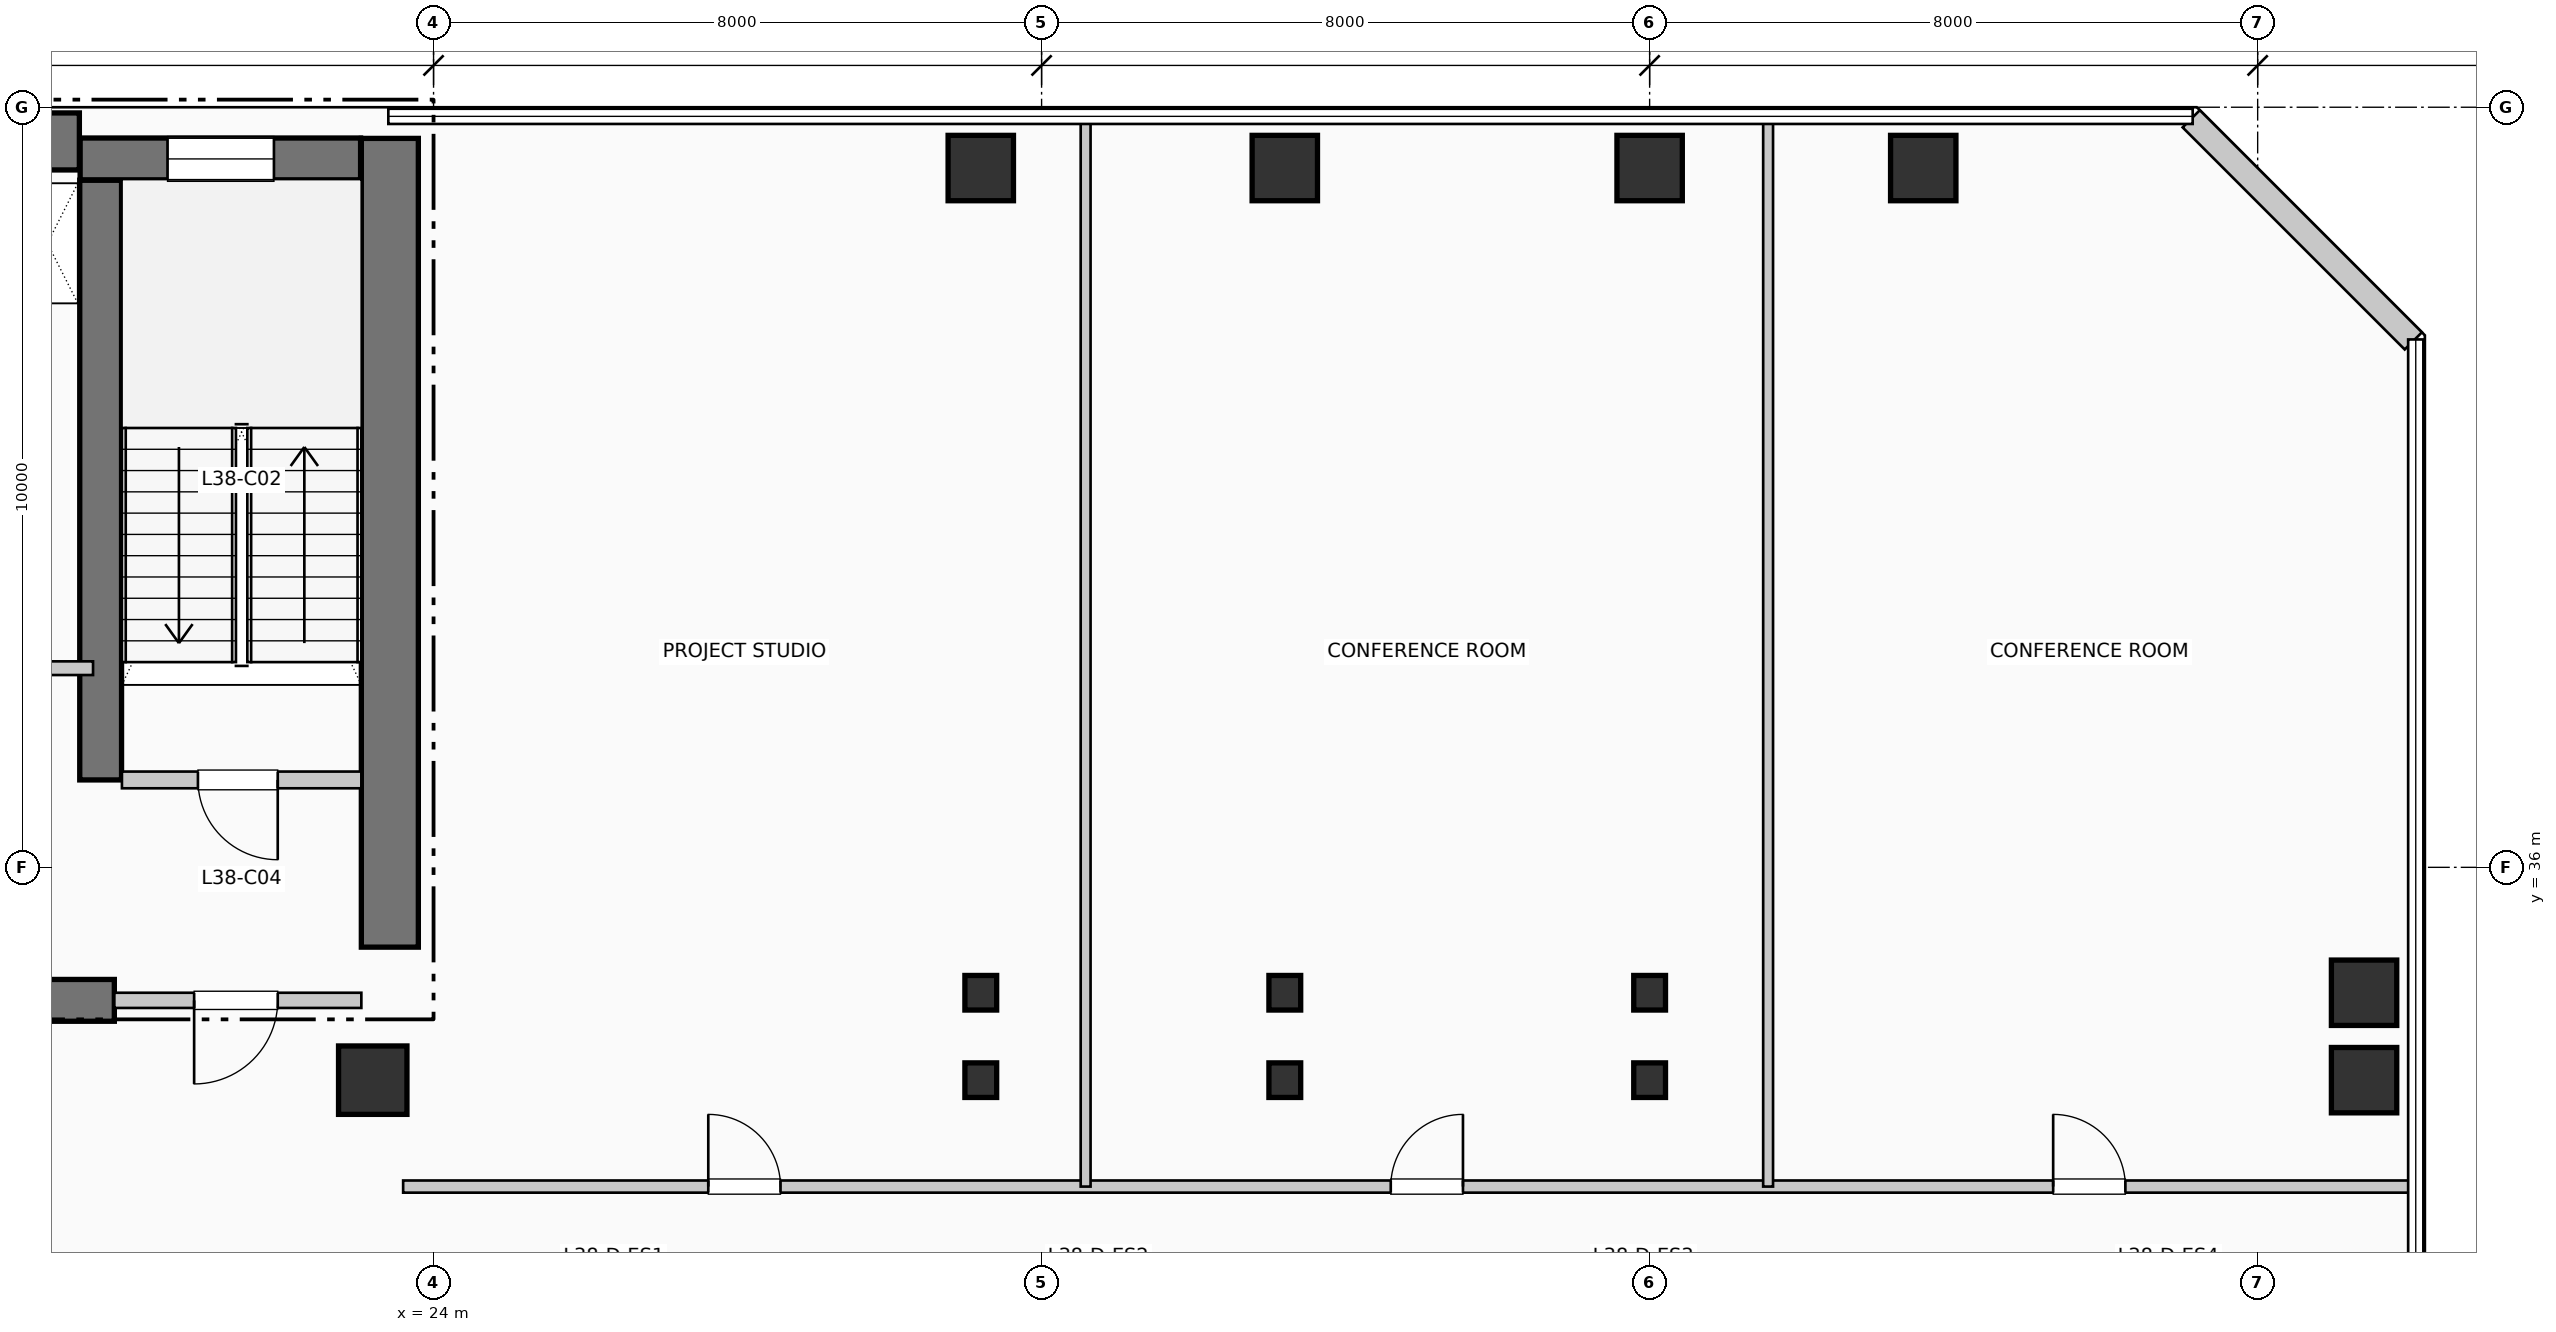
"""IFC4 building model, lengths in metres.
Left out: names, types, materials, properties, quantities, classifications, styles, units other than length and angle.
Written with IfcOpenShell. Run it as: python <this file> out.ifc"""

import sys

from ifc_helpers import new_model, si_unit, direction, frame, frame_2d, origin, origin_2d, place, context, subcontext, project, spatial, rectangle, i_section, extrude, element, fill, save


model = new_model("IFC4")
c1 = context("Model", 3, precision=1e-05, world=origin(), true_north=direction((0.0, 1.0)))
c2 = subcontext(c1, "Body", "Model", "MODEL_VIEW")
j1 = project(units=[si_unit("LENGTHUNIT", "METRE"), si_unit("PLANEANGLEUNIT", "RADIAN")], contexts=[c1])
p1 = place(None, origin())
s1 = spatial("IfcSite", under=j1, at=p1, CompositionType="ELEMENT")
p2 = place(p1, origin())
s2 = spatial("IfcBuilding", under=s1, at=p2, CompositionType="ELEMENT")
p3 = place(p2, frame((0.0, 0.0, 158.73)))
s3 = spatial("IfcBuildingStorey", under=s2, at=p3, CompositionType="ELEMENT", Elevation=158.73)
p4 = place(p3, frame((5.36, 45.55, 0.0), z_axis=(0.0, 0.0, 1.0), x_axis=(1.0, 0.0, 0.0)))
e1 = element("IfcWall", 1, at=p4, inside=s3, PredefinedType="SHEAR", context=c2, shape_type="SweptSolid", body=[
    extrude(rectangle(XDim=13.98, YDim=0.75, at=frame_2d((6.99, 0.0))), origin(), (0.0, 0.0, 1.0), 3.96),
])
p5 = place(p3, frame((23.425, 34.95, 0.0), z_axis=(0.0, 0.0, 1.0), x_axis=(0.0, 1.0, 0.0)))
e2 = element("IfcWall", 2, at=p5, inside=s3, PredefinedType="SHEAR", context=c2, shape_type="SweptSolid", body=[
    extrude(rectangle(XDim=10.64, YDim=0.75, at=frame_2d((5.32, 0.0))), origin(), (0.0, 0.0, 1.0), 3.96),
])
p6 = place(p3, frame((13.68, 34.25, 0.0), z_axis=(0.0, 0.0, 1.0), x_axis=(1.0, 0.0, 0.0)))
e3 = element("IfcWall", 3, at=p6, inside=s3, PredefinedType="SHEAR", context=c2, shape_type="SweptSolid", body=[
    extrude(rectangle(XDim=6.12, YDim=0.55, at=frame_2d((3.06, 0.0))), origin(), (0.0, 0.0, 1.0), 3.96),
])
p7 = place(p3, frame((19.62, 37.15, 0.0), z_axis=(0.0, 0.0, 1.0), x_axis=(0.0, 1.0, 0.0)))
e4 = element("IfcWall", 4, at=p7, inside=s3, PredefinedType="SHEAR", context=c2, shape_type="SweptSolid", body=[
    extrude(rectangle(XDim=7.89, YDim=0.55, at=frame_2d((3.945, 0.0))), origin(), (0.0, 0.0, 1.0), 3.96),
])
p8 = place(p3, frame((19.35, 45.32, 0.0), z_axis=(0.0, 0.0, 1.0), x_axis=(1.0, 0.0, 0.0)))
e5 = element("IfcWall", 5, at=p8, inside=s3, PredefinedType="SHEAR", context=c2, shape_type="SweptSolid", body=[
    extrude(rectangle(XDim=3.69, YDim=0.55, at=frame_2d((1.845, 0.0))), origin(), (0.0, 0.0, 1.0), 3.96),
])
p9 = place(p8, frame((1.15, 0.0, 1.05)))
e6 = element("IfcOpeningElement", 6, at=p9, cuts=e5, PredefinedType="OPENING", context=c2, shape_type="SweptSolid", body=[
    extrude(rectangle(XDim=1.4, YDim=1.8, at=frame_2d((0.7, 0.9))), frame((0.0, 0.285, 0.0), z_axis=(0.0, -1.0, 0.0), x_axis=(1.0, 0.0, 0.0)), (0.0, 0.0, 1.0), 0.57),
])
p10 = place(p3, frame((23.2, 33.2, 0.0), z_axis=(0.0, 0.0, 1.0), x_axis=(1.0, 0.0, 0.0)))
e7 = element("IfcColumn", 7, at=p10, inside=s3, PredefinedType="COLUMN", context=c2, shape_type="SweptSolid", body=[
    extrude(rectangle(XDim=0.9, YDim=0.9, at=origin_2d()), origin(), (0.0, 0.0, 1.0), 3.96),
])
for number, where, z_axis, x_axis in (
    (8, (31.2, 33.2, 0.0), (0.0, 0.0, 1.0), (1.0, 0.0, 0.0)),
    (9, (31.2, 34.35, 0.0), (0.0, 0.0, 1.0), (1.0, 0.0, 0.0)),
):
    element("IfcColumn", number, at=place(p3, frame(where, z_axis=z_axis, x_axis=x_axis)), inside=s3, PredefinedType="COLUMN", context=c2, shape_type="SweptSolid", body=[
        extrude(i_section(OverallWidth=0.418, OverallDepth=0.455, WebThickness=0.032, FlangeThickness=0.051, at=origin_2d()), origin(), (0.0, 0.0, 1.0), 3.96),
    ])
p11 = place(p3, frame((31.2, 45.2, 0.0), z_axis=(0.0, 0.0, 1.0), x_axis=(1.0, 0.0, 0.0)))
e10 = element("IfcColumn", 10, at=p11, inside=s3, PredefinedType="COLUMN", context=c2, shape_type="SweptSolid", body=[
    extrude(rectangle(XDim=0.86, YDim=0.86, at=origin_2d()), origin(), (0.0, 0.0, 1.0), 3.96),
])
for number, where, z_axis, x_axis in (
    (11, (35.2, 33.2, 0.0), (0.0, 0.0, 1.0), (1.0, 0.0, 0.0)),
    (12, (35.2, 34.35, 0.0), (0.0, 0.0, 1.0), (1.0, 0.0, 0.0)),
):
    element("IfcColumn", number, at=place(p3, frame(where, z_axis=z_axis, x_axis=x_axis)), inside=s3, PredefinedType="COLUMN", context=c2, shape_type="SweptSolid", body=[
        extrude(i_section(OverallWidth=0.418, OverallDepth=0.455, WebThickness=0.032, FlangeThickness=0.051, at=origin_2d()), origin(), (0.0, 0.0, 1.0), 3.96),
    ])
p12 = place(p3, frame((35.2, 45.2, 0.0), z_axis=(0.0, 0.0, 1.0), x_axis=(1.0, 0.0, 0.0)))
e13 = element("IfcColumn", 13, at=p12, inside=s3, PredefinedType="COLUMN", context=c2, shape_type="SweptSolid", body=[
    extrude(rectangle(XDim=0.86, YDim=0.86, at=origin_2d()), origin(), (0.0, 0.0, 1.0), 3.96),
])
for number, where, z_axis, x_axis in (
    (14, (40.0, 33.2, 0.0), (0.0, 0.0, 1.0), (1.0, 0.0, 0.0)),
    (15, (40.0, 34.35, 0.0), (0.0, 0.0, 1.0), (1.0, 0.0, 0.0)),
):
    element("IfcColumn", number, at=place(p3, frame(where, z_axis=z_axis, x_axis=x_axis)), inside=s3, PredefinedType="COLUMN", context=c2, shape_type="SweptSolid", body=[
        extrude(i_section(OverallWidth=0.418, OverallDepth=0.455, WebThickness=0.032, FlangeThickness=0.051, at=origin_2d()), origin(), (0.0, 0.0, 1.0), 3.96),
    ])
for number, where, z_axis, x_axis in (
    (16, (40.0, 45.2, 0.0), (0.0, 0.0, 1.0), (1.0, 0.0, 0.0)),
    (17, (43.6, 45.2, 0.0), (0.0, 0.0, 1.0), (1.0, 0.0, 0.0)),
    (18, (49.4, 33.2, 0.0), (0.0, 0.0, 1.0), (1.0, 0.0, 0.0)),
    (19, (49.4, 34.35, 0.0), (0.0, 0.0, 1.0), (1.0, 0.0, 0.0)),
):
    element("IfcColumn", number, at=place(p3, frame(where, z_axis=z_axis, x_axis=x_axis)), inside=s3, PredefinedType="COLUMN", context=c2, shape_type="SweptSolid", body=[
        extrude(rectangle(XDim=0.86, YDim=0.86, at=origin_2d()), origin(), (0.0, 0.0, 1.0), 3.96),
    ])
p13 = place(p3, frame((50.048, 42.926, 0.0), z_axis=(0.0, 0.0, 1.0), x_axis=(-0.707136318428, 0.707077242712, 0.0)))
e20 = element("IfcWall", 20, at=p13, inside=s3, PredefinedType="SOLIDWALL", context=c2, shape_type="SweptSolid", body=[
    extrude(rectangle(XDim=4.133, YDim=0.32, at=frame_2d((2.066, 0.0))), origin(), (0.0, 0.0, 1.0), 3.71),
])
p14 = place(p3, frame((19.9, 37.15, 0.0), z_axis=(0.0, 0.0, 1.0), x_axis=(1.0, 0.0, 0.0)))
e21 = element("IfcWall", 21, at=p14, inside=s3, PredefinedType="PARTITIONING", context=c2, shape_type="SweptSolid", body=[
    extrude(rectangle(XDim=3.15, YDim=0.22, at=frame_2d((1.575, 0.0))), origin(), (0.0, 0.0, 1.0), 3.71),
])
p15 = place(p14, frame((2.05, 0.0, 0.0), z_axis=(0.0, 0.0, 1.0), x_axis=(-1.0, 0.0, 0.0)))
e22 = element("IfcOpeningElement", 22, at=p15, cuts=e21, PredefinedType="OPENING", context=c2, shape_type="SweptSolid", body=[
    extrude(rectangle(XDim=1.05, YDim=2.15, at=frame_2d((0.525, 1.075))), frame((0.0, 0.12, 0.0), z_axis=(0.0, -1.0, 0.0), x_axis=(1.0, 0.0, 0.0)), (0.0, 0.0, 1.0), 0.24),
])
p16 = place(p3, frame((19.8, 34.25, 0.0), z_axis=(0.0, 0.0, 1.0), x_axis=(1.0, 0.0, 0.0)))
e23 = element("IfcWall", 23, at=p16, inside=s3, PredefinedType="PARTITIONING", context=c2, shape_type="SweptSolid", body=[
    extrude(rectangle(XDim=3.25, YDim=0.2, at=frame_2d((1.625, 0.0))), origin(), (0.0, 0.0, 1.0), 3.71),
])
p17 = place(p16, frame((2.15, 0.0, 0.0), z_axis=(0.0, 0.0, 1.0), x_axis=(-1.0, 0.0, 0.0)))
e24 = element("IfcOpeningElement", 24, at=p17, cuts=e23, PredefinedType="OPENING", context=c2, shape_type="SweptSolid", body=[
    extrude(rectangle(XDim=1.1, YDim=2.15, at=frame_2d((0.55, 1.075))), frame((0.0, 0.11, 0.0), z_axis=(0.0, -1.0, 0.0), x_axis=(1.0, 0.0, 0.0)), (0.0, 0.0, 1.0), 0.22),
])
p18 = place(p3, frame((17.68, 38.62, 0.0), z_axis=(0.0, 0.0, 1.0), x_axis=(1.0, 0.0, 0.0)))
e25 = element("IfcWall", 25, at=p18, inside=s3, PredefinedType="PARTITIONING", context=c2, shape_type="SweptSolid", body=[
    extrude(rectangle(XDim=1.84, YDim=0.18, at=frame_2d((0.92, 0.0))), origin(), (0.0, 0.0, 1.0), 3.71),
])
p19 = place(p18, frame((0.24, 0.0, 0.0)))
e26 = element("IfcOpeningElement", 26, at=p19, cuts=e25, PredefinedType="OPENING", context=c2, shape_type="SweptSolid", body=[
    extrude(rectangle(XDim=0.92, YDim=2.1, at=frame_2d((0.46, 1.05))), frame((0.0, 0.1, 0.0), z_axis=(0.0, -1.0, 0.0), x_axis=(1.0, 0.0, 0.0)), (0.0, 0.0, 1.0), 0.2),
])
p20 = place(p3, frame((23.6, 31.8, 0.0), z_axis=(0.0, 0.0, 1.0), x_axis=(1.0, 0.0, 0.0)))
e27 = element("IfcWall", 27, at=p20, inside=s3, PredefinedType="PARTITIONING", context=c2, shape_type="SweptSolid", body=[
    extrude(rectangle(XDim=26.41, YDim=0.16, at=frame_2d((13.205, 0.0))), origin(), (0.0, 0.0, 1.0), 3.71),
])
p21 = place(p20, frame((4.015, 0.0, 0.0)))
e28 = element("IfcOpeningElement", 28, at=p21, cuts=e27, PredefinedType="OPENING", context=c2, shape_type="SweptSolid", body=[
    extrude(rectangle(XDim=0.95, YDim=2.15, at=frame_2d((0.475, 1.075))), frame((0.0, 0.09, 0.0), z_axis=(0.0, -1.0, 0.0), x_axis=(1.0, 0.0, 0.0)), (0.0, 0.0, 1.0), 0.18),
])
p22 = place(p20, frame((12.994, 0.0, 0.0)))
e29 = element("IfcOpeningElement", 29, at=p22, cuts=e27, PredefinedType="OPENING", context=c2, shape_type="SweptSolid", body=[
    extrude(rectangle(XDim=0.95, YDim=2.15, at=frame_2d((0.475, 1.075))), frame((0.0, 0.09, 0.0), z_axis=(0.0, -1.0, 0.0), x_axis=(1.0, 0.0, 0.0)), (0.0, 0.0, 1.0), 0.18),
])
p23 = place(p20, frame((21.709, 0.0, 0.0)))
e30 = element("IfcOpeningElement", 30, at=p23, cuts=e27, PredefinedType="OPENING", context=c2, shape_type="SweptSolid", body=[
    extrude(rectangle(XDim=0.95, YDim=2.15, at=frame_2d((0.475, 1.075))), frame((0.0, 0.09, 0.0), z_axis=(0.0, -1.0, 0.0), x_axis=(1.0, 0.0, 0.0)), (0.0, 0.0, 1.0), 0.18),
])
for number, where, z_axis, x_axis in (
    (31, (32.579, 31.8, 0.0), (0.0, 0.0, 1.0), (0.0, 1.0, 0.0)),
    (32, (41.559, 31.8, 0.0), (0.0, 0.0, 1.0), (0.0, 1.0, 0.0)),
):
    element("IfcWall", number, at=place(p3, frame(where, z_axis=z_axis, x_axis=x_axis)), inside=s3, PredefinedType="PARTITIONING", context=c2, shape_type="SweptSolid", body=[
        extrude(rectangle(XDim=14.01, YDim=0.13, at=frame_2d((7.005, 0.0))), origin(), (0.0, 0.0, 1.0), 3.71),
    ])
p24 = place(p9, origin())
e33 = element("IfcWindow", 33, at=p24, inside=s3, PartitioningType="SINGLE_PANEL", PredefinedType="WINDOW", context=c2, shape_type="SweptSolid", body=[
    extrude(rectangle(XDim=1.4, YDim=1.8, at=frame_2d((0.7, 0.9))), frame((0.0, 0.03, 0.0), z_axis=(0.0, -1.0, 0.0), x_axis=(1.0, 0.0, 0.0)), (0.0, 0.0, 1.0), 0.06),
])
fill(e6, e33)
p25 = place(p15, origin())
e34 = element("IfcDoor", 34, at=p25, inside=s3, OperationType="SINGLE_SWING_RIGHT", PredefinedType="DOOR", context=c2, shape_type="SweptSolid", body=[
    extrude(rectangle(XDim=1.05, YDim=2.15, at=frame_2d((0.525, 1.075))), frame((0.0, 0.025, 0.0), z_axis=(0.0, -1.0, 0.0), x_axis=(1.0, 0.0, 0.0)), (0.0, 0.0, 1.0), 0.05),
])
fill(e22, e34)
p26 = place(p17, origin())
e35 = element("IfcDoor", 35, at=p26, inside=s3, OperationType="SINGLE_SWING_LEFT", PredefinedType="DOOR", context=c2, shape_type="SweptSolid", body=[
    extrude(rectangle(XDim=1.1, YDim=2.15, at=frame_2d((0.55, 1.075))), frame((0.0, 0.025, 0.0), z_axis=(0.0, -1.0, 0.0), x_axis=(1.0, 0.0, 0.0)), (0.0, 0.0, 1.0), 0.05),
])
fill(e24, e35)
p27 = place(p21, origin())
e36 = element("IfcDoor", 36, at=p27, inside=s3, OperationType="SINGLE_SWING_LEFT", PredefinedType="DOOR", context=c2, shape_type="SweptSolid", body=[
    extrude(rectangle(XDim=0.95, YDim=2.15, at=frame_2d((0.475, 1.075))), frame((0.0, 0.025, 0.0), z_axis=(0.0, -1.0, 0.0), x_axis=(1.0, 0.0, 0.0)), (0.0, 0.0, 1.0), 0.05),
])
fill(e28, e36)
p28 = place(p22, origin())
e37 = element("IfcDoor", 37, at=p28, inside=s3, OperationType="SINGLE_SWING_RIGHT", PredefinedType="DOOR", context=c2, shape_type="SweptSolid", body=[
    extrude(rectangle(XDim=0.95, YDim=2.15, at=frame_2d((0.475, 1.075))), frame((0.0, 0.025, 0.0), z_axis=(0.0, -1.0, 0.0), x_axis=(1.0, 0.0, 0.0)), (0.0, 0.0, 1.0), 0.05),
])
fill(e29, e37)
p29 = place(p23, origin())
e38 = element("IfcDoor", 38, at=p29, inside=s3, OperationType="SINGLE_SWING_LEFT", PredefinedType="DOOR", context=c2, shape_type="SweptSolid", body=[
    extrude(rectangle(XDim=0.95, YDim=2.15, at=frame_2d((0.475, 1.075))), frame((0.0, 0.025, 0.0), z_axis=(0.0, -1.0, 0.0), x_axis=(1.0, 0.0, 0.0)), (0.0, 0.0, 1.0), 0.05),
])
fill(e30, e38)
save(model, sys.argv[1])
